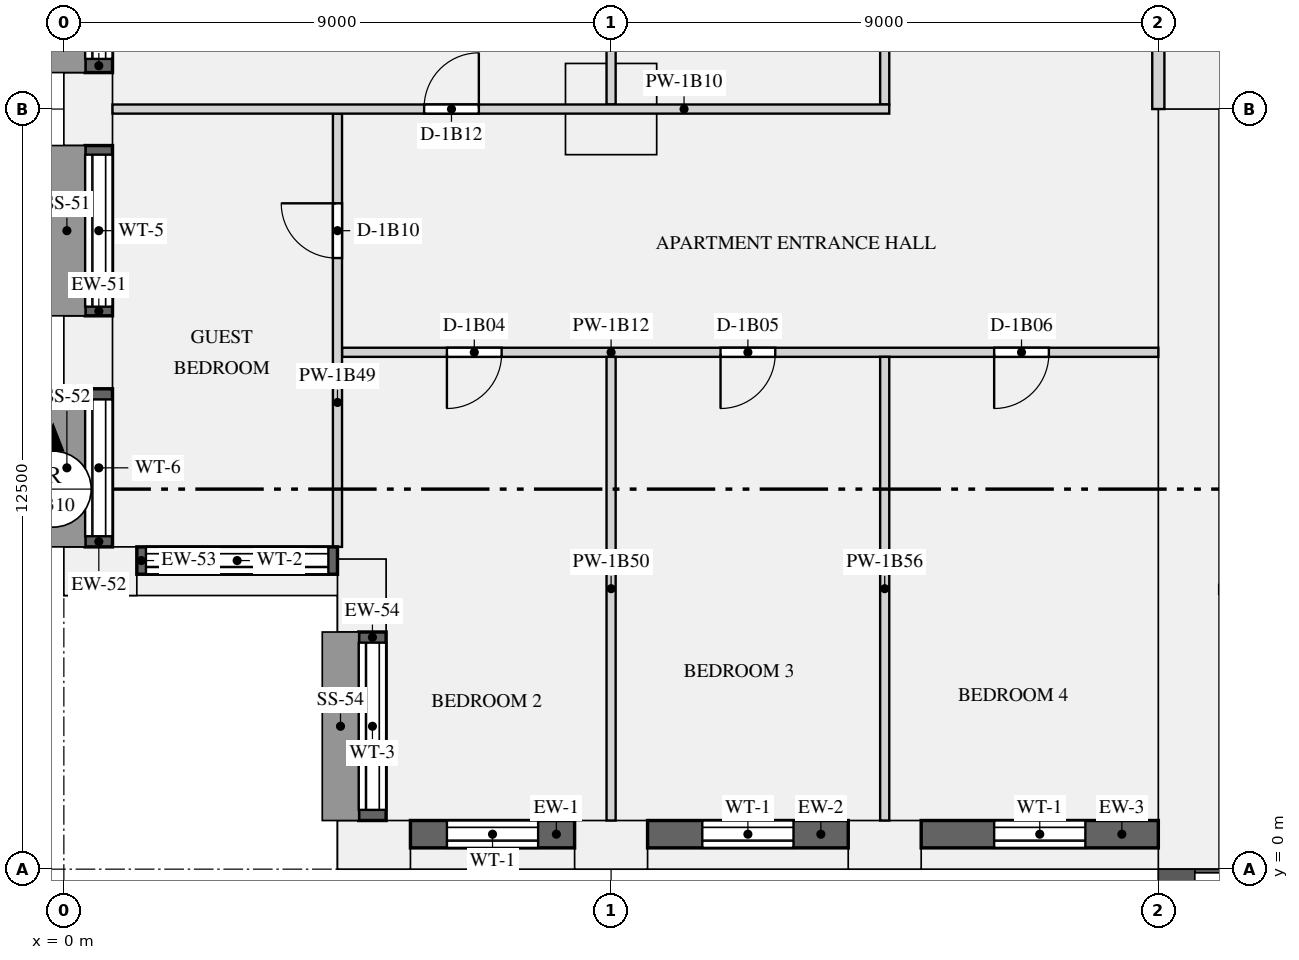
"""IFC4 building model, lengths in metres.
Left out: names, types, materials, properties, quantities, classifications, styles, units other than length and angle.
Written with IfcOpenShell. Run it as: python <this file> out.ifc"""

import sys

from ifc_helpers import new_model, si_unit, direction, frame, frame_2d, origin, origin_2d, place, context, subcontext, project, spatial, rectangle, extrude, element, fill, save


model = new_model("IFC4")
c1 = context("Model", 3, precision=1e-05, world=origin(), true_north=direction((0.0, 1.0)))
c2 = subcontext(c1, "Body", "Model", "MODEL_VIEW")
j1 = project(units=[si_unit("LENGTHUNIT", "METRE"), si_unit("PLANEANGLEUNIT", "RADIAN")], contexts=[c1])
p1 = place(None, origin())
s1 = spatial("IfcSite", under=j1, at=p1, CompositionType="ELEMENT")
p2 = place(p1, origin())
s2 = spatial("IfcBuilding", under=s1, at=p2, CompositionType="ELEMENT")
p3 = place(p2, frame((0.0, 0.0, 28.95)))
s3 = spatial("IfcBuildingStorey", under=s2, at=p3, CompositionType="ELEMENT", Elevation=28.95)
for number, where, z_axis, x_axis in (
    (1, (5.1, 0.4, 0.0), (0.0, 0.0, 1.0), (1.0, 0.0, 0.0)),
    (2, (9.0, 0.4, 0.0), (0.0, 0.0, 1.0), (1.0, 0.0, 0.0)),
    (3, (13.5, 0.4, 0.0), (0.0, 0.0, 1.0), (1.0, 0.0, 0.0)),
    (4, (0.4, 12.5, 0.0), (0.0, 0.0, 1.0), (0.0, -1.0, 0.0)),
    (5, (0.4, 8.5, 0.0), (0.0, 0.0, 1.0), (0.0, -1.0, 0.0)),
    (6, (0.6, 4.9, 0.0), (0.0, 0.0, 1.0), (1.0, 0.0, 0.0)),
    (7, (4.9, 4.5, 0.0), (0.0, 0.0, 1.0), (0.0, -1.0, 0.0)),
):
    element("IfcColumn", number, at=place(p3, frame(where, z_axis=z_axis, x_axis=x_axis)), inside=s3, PredefinedType="USERDEFINED", context=c2, shape_type="SweptSolid", body=[
        extrude(rectangle(XDim=1.2, YDim=0.8, at=origin_2d()), origin(), (0.0, 0.0, 1.0), 3.15),
    ])
p4 = place(p3, frame((9.0, 12.5, 0.0), z_axis=(0.0, 0.0, 1.0), x_axis=(1.0, 0.0, 0.0)))
e8 = element("IfcColumn", 8, at=p4, inside=s3, PredefinedType="COLUMN", context=c2, shape_type="SweptSolid", body=[
    extrude(rectangle(XDim=1.5, YDim=1.5, at=origin_2d()), origin(), (0.0, 0.0, 1.0), 3.15),
])
p5 = place(p3, frame((18.5, 0.0, 0.0), z_axis=(0.0, 0.0, 1.0), x_axis=(0.0, 1.0, 0.0)))
e9 = element("IfcWall", 9, at=p5, inside=s3, PredefinedType="SHEAR", context=c2, shape_type="SweptSolid", body=[
    extrude(rectangle(XDim=12.5, YDim=1.0, at=frame_2d((6.25, 0.0))), origin(), (0.0, 0.0, 1.0), 3.15),
])
p6 = place(p3, frame((5.7, 0.575, 0.9), z_axis=(0.0, 0.0, 1.0), x_axis=(1.0, 0.0, 0.0)))
e10 = element("IfcWall", 10, at=p6, inside=s3, PredefinedType="SOLIDWALL", context=c2, shape_type="SweptSolid", body=[
    extrude(rectangle(XDim=2.7, YDim=0.45, at=frame_2d((1.35, 0.0))), origin(), (0.0, 0.0, 1.0), 1.93),
])
p7 = place(p6, frame((0.6, 0.0, 0.15)))
e11 = element("IfcOpeningElement", 11, at=p7, cuts=e10, PredefinedType="OPENING", context=c2, shape_type="SweptSolid", body=[
    extrude(rectangle(XDim=1.5, YDim=1.5, at=frame_2d((0.75, 0.75))), frame((0.0, 0.235, 0.0), z_axis=(0.0, -1.0, 0.0), x_axis=(1.0, 0.0, 0.0)), (0.0, 0.0, 1.0), 0.47),
])
p8 = place(p3, frame((9.6, 0.575, 0.9), z_axis=(0.0, 0.0, 1.0), x_axis=(1.0, 0.0, 0.0)))
e12 = element("IfcWall", 12, at=p8, inside=s3, PredefinedType="SOLIDWALL", context=c2, shape_type="SweptSolid", body=[
    extrude(rectangle(XDim=3.3, YDim=0.45, at=frame_2d((1.65, 0.0))), origin(), (0.0, 0.0, 1.0), 1.93),
])
p9 = place(p8, frame((0.9, 0.0, 0.15)))
e13 = element("IfcOpeningElement", 13, at=p9, cuts=e12, PredefinedType="OPENING", context=c2, shape_type="SweptSolid", body=[
    extrude(rectangle(XDim=1.5, YDim=1.5, at=frame_2d((0.75, 0.75))), frame((0.0, 0.235, 0.0), z_axis=(0.0, -1.0, 0.0), x_axis=(1.0, 0.0, 0.0)), (0.0, 0.0, 1.0), 0.47),
])
p10 = place(p3, frame((14.1, 0.575, 0.9), z_axis=(0.0, 0.0, 1.0), x_axis=(1.0, 0.0, 0.0)))
e14 = element("IfcWall", 14, at=p10, inside=s3, PredefinedType="SOLIDWALL", context=c2, shape_type="SweptSolid", body=[
    extrude(rectangle(XDim=3.9, YDim=0.45, at=frame_2d((1.95, 0.0))), origin(), (0.0, 0.0, 1.0), 1.93),
])
p11 = place(p10, frame((1.2, 0.0, 0.15)))
e15 = element("IfcOpeningElement", 15, at=p11, cuts=e14, PredefinedType="OPENING", context=c2, shape_type="SweptSolid", body=[
    extrude(rectangle(XDim=1.5, YDim=1.5, at=frame_2d((0.75, 0.75))), frame((0.0, 0.235, 0.0), z_axis=(0.0, -1.0, 0.0), x_axis=(1.0, 0.0, 0.0)), (0.0, 0.0, 1.0), 0.47),
])
p12 = place(p3, frame((0.575, 15.3, 0.9), z_axis=(0.0, 0.0, 1.0), x_axis=(0.0, -1.0, 0.0)))
e16 = element("IfcWall", 16, at=p12, inside=s3, PredefinedType="SOLIDWALL", context=c2, shape_type="SweptSolid", body=[
    extrude(rectangle(XDim=2.2, YDim=0.45, at=frame_2d((1.1, 0.0))), origin(), (0.0, 0.0, 1.0), 1.93),
])
p13 = place(p12, frame((0.225, 0.0, 0.15)))
e17 = element("IfcOpeningElement", 17, at=p13, cuts=e16, PredefinedType="OPENING", context=c2, shape_type="SweptSolid", body=[
    extrude(rectangle(XDim=1.75, YDim=1.5, at=frame_2d((0.875, 0.75))), frame((0.0, 0.235, 0.0), z_axis=(0.0, -1.0, 0.0), x_axis=(1.0, 0.0, 0.0)), (0.0, 0.0, 1.0), 0.47),
])
p14 = place(p3, frame((0.575, 11.9, 0.9), z_axis=(0.0, 0.0, 1.0), x_axis=(0.0, -1.0, 0.0)))
e18 = element("IfcWall", 18, at=p14, inside=s3, PredefinedType="SOLIDWALL", context=c2, shape_type="SweptSolid", body=[
    extrude(rectangle(XDim=2.8, YDim=0.45, at=frame_2d((1.4, 0.0))), origin(), (0.0, 0.0, 1.0), 1.93),
])
p15 = place(p14, frame((0.15, 0.0, 0.15)))
e19 = element("IfcOpeningElement", 19, at=p15, cuts=e18, PredefinedType="OPENING", context=c2, shape_type="SweptSolid", body=[
    extrude(rectangle(XDim=2.5, YDim=1.5, at=frame_2d((1.25, 0.75))), frame((0.0, 0.235, 0.0), z_axis=(0.0, -1.0, 0.0), x_axis=(1.0, 0.0, 0.0)), (0.0, 0.0, 1.0), 0.47),
])
p16 = place(p3, frame((0.575, 7.9, 0.9), z_axis=(0.0, 0.0, 1.0), x_axis=(0.0, -1.0, 0.0)))
e20 = element("IfcWall", 20, at=p16, inside=s3, PredefinedType="SOLIDWALL", context=c2, shape_type="SweptSolid", body=[
    extrude(rectangle(XDim=2.6, YDim=0.45, at=frame_2d((1.3, 0.0))), origin(), (0.0, 0.0, 1.0), 1.93),
])
p17 = place(p16, frame((0.175, 0.0, 0.15)))
e21 = element("IfcOpeningElement", 21, at=p17, cuts=e20, PredefinedType="OPENING", context=c2, shape_type="SweptSolid", body=[
    extrude(rectangle(XDim=2.25, YDim=1.5, at=frame_2d((1.125, 0.75))), frame((0.0, 0.235, 0.0), z_axis=(0.0, -1.0, 0.0), x_axis=(1.0, 0.0, 0.0)), (0.0, 0.0, 1.0), 0.47),
])
p18 = place(p3, frame((1.2, 5.075, 0.9), z_axis=(0.0, 0.0, 1.0), x_axis=(1.0, 0.0, 0.0)))
e22 = element("IfcWall", 22, at=p18, inside=s3, PredefinedType="SOLIDWALL", context=c2, shape_type="SweptSolid", body=[
    extrude(rectangle(XDim=3.3, YDim=0.45, at=frame_2d((1.65, 0.0))), origin(), (0.0, 0.0, 1.0), 1.93),
])
p19 = place(p18, frame((0.15, 0.0, 0.15)))
e23 = element("IfcOpeningElement", 23, at=p19, cuts=e22, PredefinedType="OPENING", context=c2, shape_type="SweptSolid", body=[
    extrude(rectangle(XDim=3.0, YDim=1.5, at=frame_2d((1.5, 0.75))), frame((0.0, 0.235, 0.0), z_axis=(0.0, -1.0, 0.0), x_axis=(1.0, 0.0, 0.0)), (0.0, 0.0, 1.0), 0.47),
])
p20 = place(p3, frame((5.075, 3.9, 0.9), z_axis=(0.0, 0.0, 1.0), x_axis=(0.0, -1.0, 0.0)))
e24 = element("IfcWall", 24, at=p20, inside=s3, PredefinedType="SOLIDWALL", context=c2, shape_type="SweptSolid", body=[
    extrude(rectangle(XDim=3.1, YDim=0.45, at=frame_2d((1.55, 0.0))), origin(), (0.0, 0.0, 1.0), 1.93),
])
p21 = place(p20, frame((0.175, 0.0, 0.15)))
e25 = element("IfcOpeningElement", 25, at=p21, cuts=e24, PredefinedType="OPENING", context=c2, shape_type="SweptSolid", body=[
    extrude(rectangle(XDim=2.75, YDim=1.5, at=frame_2d((1.375, 0.75))), frame((0.0, 0.235, 0.0), z_axis=(0.0, -1.0, 0.0), x_axis=(1.0, 0.0, 0.0)), (0.0, 0.0, 1.0), 0.47),
])
p22 = place(p3, frame((19.0, 4.6, 0.0), z_axis=(0.0, 0.0, 1.0), x_axis=(1.0, 0.0, 0.0)))
e26 = element("IfcWall", 26, at=p22, inside=s3, PredefinedType="PARTITIONING", context=c2, shape_type="SweptSolid", body=[
    extrude(rectangle(XDim=8.3, YDim=0.15, at=frame_2d((4.15, 0.0))), origin(), (0.0, 0.0, 1.0), 2.83),
])
p23 = place(p22, frame((0.45, 0.0, 0.0)))
e27 = element("IfcOpeningElement", 27, at=p23, cuts=e26, PredefinedType="OPENING", context=c2, shape_type="SweptSolid", body=[
    extrude(rectangle(XDim=0.9, YDim=2.1, at=frame_2d((0.45, 1.05))), frame((0.0, 0.085, 0.0), z_axis=(0.0, -1.0, 0.0), x_axis=(1.0, 0.0, 0.0)), (0.0, 0.0, 1.0), 0.17),
])
p24 = place(p22, frame((5.85, 0.0, 0.0)))
e28 = element("IfcOpeningElement", 28, at=p24, cuts=e26, PredefinedType="OPENING", context=c2, shape_type="SweptSolid", body=[
    extrude(rectangle(XDim=0.9, YDim=2.1, at=frame_2d((0.45, 1.05))), frame((0.0, 0.085, 0.0), z_axis=(0.0, -1.0, 0.0), x_axis=(1.0, 0.0, 0.0)), (0.0, 0.0, 1.0), 0.17),
])
p25 = place(p3, frame((18.0, 12.5, 0.0), z_axis=(0.0, 0.0, 1.0), x_axis=(0.0, 1.0, 0.0)))
e29 = element("IfcWall", 29, at=p25, inside=s3, PredefinedType="PARTITIONING", context=c2, shape_type="SweptSolid", body=[
    extrude(rectangle(XDim=3.4, YDim=0.2, at=frame_2d((1.7, 0.0))), origin(), (0.0, 0.0, 1.0), 2.83),
])
p26 = place(p3, frame((0.8, 12.5, 0.0), z_axis=(0.0, 0.0, 1.0), x_axis=(1.0, 0.0, 0.0)))
e30 = element("IfcWall", 30, at=p26, inside=s3, PredefinedType="PARTITIONING", context=c2, shape_type="SweptSolid", body=[
    extrude(rectangle(XDim=12.775, YDim=0.15, at=frame_2d((6.387, 0.0))), origin(), (0.0, 0.0, 1.0), 2.83),
])
p27 = place(p26, frame((5.125, 0.0, 0.0)))
e31 = element("IfcOpeningElement", 31, at=p27, cuts=e30, PredefinedType="OPENING", context=c2, shape_type="SweptSolid", body=[
    extrude(rectangle(XDim=0.9, YDim=2.1, at=frame_2d((0.45, 1.05))), frame((0.0, 0.085, 0.0), z_axis=(0.0, -1.0, 0.0), x_axis=(1.0, 0.0, 0.0)), (0.0, 0.0, 1.0), 0.17),
])
p28 = place(p3, frame((4.575, 8.5, 0.0), z_axis=(0.0, 0.0, 1.0), x_axis=(1.0, 0.0, 0.0)))
e32 = element("IfcWall", 32, at=p28, inside=s3, PredefinedType="PARTITIONING", context=c2, shape_type="SweptSolid", body=[
    extrude(rectangle(XDim=13.425, YDim=0.15, at=frame_2d((6.712, 0.0))), origin(), (0.0, 0.0, 1.0), 2.83),
])
p29 = place(p28, frame((1.725, 0.0, 0.0)))
e33 = element("IfcOpeningElement", 33, at=p29, cuts=e32, PredefinedType="OPENING", context=c2, shape_type="SweptSolid", body=[
    extrude(rectangle(XDim=0.9, YDim=2.1, at=frame_2d((0.45, 1.05))), frame((0.0, 0.085, 0.0), z_axis=(0.0, -1.0, 0.0), x_axis=(1.0, 0.0, 0.0)), (0.0, 0.0, 1.0), 0.17),
])
p30 = place(p28, frame((6.225, 0.0, 0.0)))
e34 = element("IfcOpeningElement", 34, at=p30, cuts=e32, PredefinedType="OPENING", context=c2, shape_type="SweptSolid", body=[
    extrude(rectangle(XDim=0.9, YDim=2.1, at=frame_2d((0.45, 1.05))), frame((0.0, 0.085, 0.0), z_axis=(0.0, -1.0, 0.0), x_axis=(1.0, 0.0, 0.0)), (0.0, 0.0, 1.0), 0.17),
])
p31 = place(p28, frame((10.725, 0.0, 0.0)))
e35 = element("IfcOpeningElement", 35, at=p31, cuts=e32, PredefinedType="OPENING", context=c2, shape_type="SweptSolid", body=[
    extrude(rectangle(XDim=0.9, YDim=2.1, at=frame_2d((0.45, 1.05))), frame((0.0, 0.085, 0.0), z_axis=(0.0, -1.0, 0.0), x_axis=(1.0, 0.0, 0.0)), (0.0, 0.0, 1.0), 0.17),
])
p32 = place(p3, frame((4.5, 5.3, 0.0), z_axis=(0.0, 0.0, 1.0), x_axis=(0.0, 1.0, 0.0)))
e36 = element("IfcWall", 36, at=p32, inside=s3, PredefinedType="PARTITIONING", context=c2, shape_type="SweptSolid", body=[
    extrude(rectangle(XDim=7.125, YDim=0.15, at=frame_2d((3.562, 0.0))), origin(), (0.0, 0.0, 1.0), 2.83),
])
p33 = place(p32, frame((4.75, 0.0, 0.0)))
e37 = element("IfcOpeningElement", 37, at=p33, cuts=e36, PredefinedType="OPENING", context=c2, shape_type="SweptSolid", body=[
    extrude(rectangle(XDim=0.9, YDim=2.1, at=frame_2d((0.45, 1.05))), frame((0.0, 0.085, 0.0), z_axis=(0.0, -1.0, 0.0), x_axis=(1.0, 0.0, 0.0)), (0.0, 0.0, 1.0), 0.17),
])
p34 = place(p3, frame((9.0, 0.8, 0.0), z_axis=(0.0, 0.0, 1.0), x_axis=(0.0, 1.0, 0.0)))
e38 = element("IfcWall", 38, at=p34, inside=s3, PredefinedType="PARTITIONING", context=c2, shape_type="SweptSolid", body=[
    extrude(rectangle(XDim=7.625, YDim=0.15, at=frame_2d((3.812, 0.0))), origin(), (0.0, 0.0, 1.0), 2.83),
])
p35 = place(p3, frame((9.0, 12.575, 0.0), z_axis=(0.0, 0.0, 1.0), x_axis=(0.0, 1.0, 0.0)))
e39 = element("IfcWall", 39, at=p35, inside=s3, PredefinedType="PARTITIONING", context=c2, shape_type="SweptSolid", body=[
    extrude(rectangle(XDim=11.35, YDim=0.15, at=frame_2d((5.675, 0.0))), origin(), (0.0, 0.0, 1.0), 2.83),
])
p36 = place(p3, frame((13.5, 0.8, 0.0), z_axis=(0.0, 0.0, 1.0), x_axis=(0.0, 1.0, 0.0)))
e40 = element("IfcWall", 40, at=p36, inside=s3, PredefinedType="PARTITIONING", context=c2, shape_type="SweptSolid", body=[
    extrude(rectangle(XDim=7.625, YDim=0.15, at=frame_2d((3.812, 0.0))), origin(), (0.0, 0.0, 1.0), 2.83),
])
p37 = place(p3, frame((13.5, 12.575, 0.0), z_axis=(0.0, 0.0, 1.0), x_axis=(0.0, 1.0, 0.0)))
e41 = element("IfcWall", 41, at=p37, inside=s3, PredefinedType="PARTITIONING", context=c2, shape_type="SweptSolid", body=[
    extrude(rectangle(XDim=10.325, YDim=0.15, at=frame_2d((5.163, 0.0))), origin(), (0.0, 0.0, 1.0), 2.83),
])
p38 = place(p37, frame((1.475, 0.0, 0.0)))
e42 = element("IfcOpeningElement", 42, at=p38, cuts=e41, PredefinedType="OPENING", context=c2, shape_type="SweptSolid", body=[
    extrude(rectangle(XDim=0.9, YDim=2.1, at=frame_2d((0.45, 1.05))), frame((0.0, 0.085, 0.0), z_axis=(0.0, -1.0, 0.0), x_axis=(1.0, 0.0, 0.0)), (0.0, 0.0, 1.0), 0.17),
])
p39 = place(p37, frame((5.475, 0.0, 0.0)))
e43 = element("IfcOpeningElement", 43, at=p39, cuts=e41, PredefinedType="OPENING", context=c2, shape_type="SweptSolid", body=[
    extrude(rectangle(XDim=0.9, YDim=2.1, at=frame_2d((0.45, 1.05))), frame((0.0, 0.085, 0.0), z_axis=(0.0, -1.0, 0.0), x_axis=(1.0, 0.0, 0.0)), (0.0, 0.0, 1.0), 0.17),
])
p40 = place(p7, origin())
e44 = element("IfcWindow", 44, at=p40, inside=s3, PartitioningType="SINGLE_PANEL", PredefinedType="WINDOW", context=c2, shape_type="SweptSolid", body=[
    extrude(rectangle(XDim=1.5, YDim=1.5, at=frame_2d((0.75, 0.75))), frame((0.0, -0.065, 0.0), z_axis=(0.0, -1.0, 0.0), x_axis=(1.0, 0.0, 0.0)), (0.0, 0.0, 1.0), 0.06),
])
fill(e11, e44)
p41 = place(p9, origin())
e45 = element("IfcWindow", 45, at=p41, inside=s3, PartitioningType="SINGLE_PANEL", PredefinedType="WINDOW", context=c2, shape_type="SweptSolid", body=[
    extrude(rectangle(XDim=1.5, YDim=1.5, at=frame_2d((0.75, 0.75))), frame((0.0, -0.065, 0.0), z_axis=(0.0, -1.0, 0.0), x_axis=(1.0, 0.0, 0.0)), (0.0, 0.0, 1.0), 0.06),
])
fill(e13, e45)
p42 = place(p11, origin())
e46 = element("IfcWindow", 46, at=p42, inside=s3, PartitioningType="SINGLE_PANEL", PredefinedType="WINDOW", context=c2, shape_type="SweptSolid", body=[
    extrude(rectangle(XDim=1.5, YDim=1.5, at=frame_2d((0.75, 0.75))), frame((0.0, -0.065, 0.0), z_axis=(0.0, -1.0, 0.0), x_axis=(1.0, 0.0, 0.0)), (0.0, 0.0, 1.0), 0.06),
])
fill(e15, e46)
p43 = place(p13, origin())
e47 = element("IfcWindow", 47, at=p43, inside=s3, PartitioningType="SINGLE_PANEL", PredefinedType="WINDOW", context=c2, shape_type="SweptSolid", body=[
    extrude(rectangle(XDim=1.75, YDim=1.5, at=frame_2d((0.875, 0.75))), frame((0.0, -0.065, 0.0), z_axis=(0.0, -1.0, 0.0), x_axis=(1.0, 0.0, 0.0)), (0.0, 0.0, 1.0), 0.06),
])
fill(e17, e47)
p44 = place(p15, origin())
e48 = element("IfcWindow", 48, at=p44, inside=s3, PartitioningType="SINGLE_PANEL", PredefinedType="WINDOW", context=c2, shape_type="SweptSolid", body=[
    extrude(rectangle(XDim=2.5, YDim=1.5, at=frame_2d((1.25, 0.75))), frame((0.0, -0.065, 0.0), z_axis=(0.0, -1.0, 0.0), x_axis=(1.0, 0.0, 0.0)), (0.0, 0.0, 1.0), 0.06),
])
fill(e19, e48)
p45 = place(p17, origin())
e49 = element("IfcWindow", 49, at=p45, inside=s3, PartitioningType="SINGLE_PANEL", PredefinedType="WINDOW", context=c2, shape_type="SweptSolid", body=[
    extrude(rectangle(XDim=2.25, YDim=1.5, at=frame_2d((1.125, 0.75))), frame((0.0, -0.065, 0.0), z_axis=(0.0, -1.0, 0.0), x_axis=(1.0, 0.0, 0.0)), (0.0, 0.0, 1.0), 0.06),
])
fill(e21, e49)
p46 = place(p19, origin())
e50 = element("IfcWindow", 50, at=p46, inside=s3, PartitioningType="SINGLE_PANEL", PredefinedType="WINDOW", context=c2, shape_type="SweptSolid", body=[
    extrude(rectangle(XDim=3.0, YDim=1.5, at=frame_2d((1.5, 0.75))), frame((0.0, -0.065, 0.0), z_axis=(0.0, -1.0, 0.0), x_axis=(1.0, 0.0, 0.0)), (0.0, 0.0, 1.0), 0.06),
])
fill(e23, e50)
p47 = place(p21, origin())
e51 = element("IfcWindow", 51, at=p47, inside=s3, PartitioningType="SINGLE_PANEL", PredefinedType="WINDOW", context=c2, shape_type="SweptSolid", body=[
    extrude(rectangle(XDim=2.75, YDim=1.5, at=frame_2d((1.375, 0.75))), frame((0.0, -0.065, 0.0), z_axis=(0.0, -1.0, 0.0), x_axis=(1.0, 0.0, 0.0)), (0.0, 0.0, 1.0), 0.06),
])
fill(e25, e51)
p48 = place(p29, frame((0.9, 0.0, 0.0), z_axis=(0.0, 0.0, 1.0), x_axis=(-1.0, 0.0, 0.0)))
e52 = element("IfcDoor", 52, at=p48, inside=s3, OperationType="SINGLE_SWING_RIGHT", PredefinedType="DOOR", context=c2, shape_type="SweptSolid", body=[
    extrude(rectangle(XDim=0.9, YDim=2.1, at=frame_2d((0.45, 1.05))), frame((0.0, 0.025, 0.0), z_axis=(0.0, -1.0, 0.0), x_axis=(1.0, 0.0, 0.0)), (0.0, 0.0, 1.0), 0.05),
])
fill(e33, e52)
p49 = place(p30, frame((0.9, 0.0, 0.0), z_axis=(0.0, 0.0, 1.0), x_axis=(-1.0, 0.0, 0.0)))
e53 = element("IfcDoor", 53, at=p49, inside=s3, OperationType="SINGLE_SWING_RIGHT", PredefinedType="DOOR", context=c2, shape_type="SweptSolid", body=[
    extrude(rectangle(XDim=0.9, YDim=2.1, at=frame_2d((0.45, 1.05))), frame((0.0, 0.025, 0.0), z_axis=(0.0, -1.0, 0.0), x_axis=(1.0, 0.0, 0.0)), (0.0, 0.0, 1.0), 0.05),
])
fill(e34, e53)
p50 = place(p31, frame((0.9, 0.0, 0.0), z_axis=(0.0, 0.0, 1.0), x_axis=(-1.0, 0.0, 0.0)))
e54 = element("IfcDoor", 54, at=p50, inside=s3, OperationType="SINGLE_SWING_RIGHT", PredefinedType="DOOR", context=c2, shape_type="SweptSolid", body=[
    extrude(rectangle(XDim=0.9, YDim=2.1, at=frame_2d((0.45, 1.05))), frame((0.0, 0.025, 0.0), z_axis=(0.0, -1.0, 0.0), x_axis=(1.0, 0.0, 0.0)), (0.0, 0.0, 1.0), 0.05),
])
fill(e35, e54)
p51 = place(p33, origin())
e55 = element("IfcDoor", 55, at=p51, inside=s3, OperationType="SINGLE_SWING_RIGHT", PredefinedType="DOOR", context=c2, shape_type="SweptSolid", body=[
    extrude(rectangle(XDim=0.9, YDim=2.1, at=frame_2d((0.45, 1.05))), frame((0.0, 0.025, 0.0), z_axis=(0.0, -1.0, 0.0), x_axis=(1.0, 0.0, 0.0)), (0.0, 0.0, 1.0), 0.05),
])
fill(e37, e55)
p52 = place(p27, origin())
e56 = element("IfcDoor", 56, at=p52, inside=s3, OperationType="SINGLE_SWING_RIGHT", PredefinedType="DOOR", context=c2, shape_type="SweptSolid", body=[
    extrude(rectangle(XDim=0.9, YDim=2.1, at=frame_2d((0.45, 1.05))), frame((0.0, 0.025, 0.0), z_axis=(0.0, -1.0, 0.0), x_axis=(1.0, 0.0, 0.0)), (0.0, 0.0, 1.0), 0.05),
])
fill(e31, e56)
save(model, sys.argv[1])
